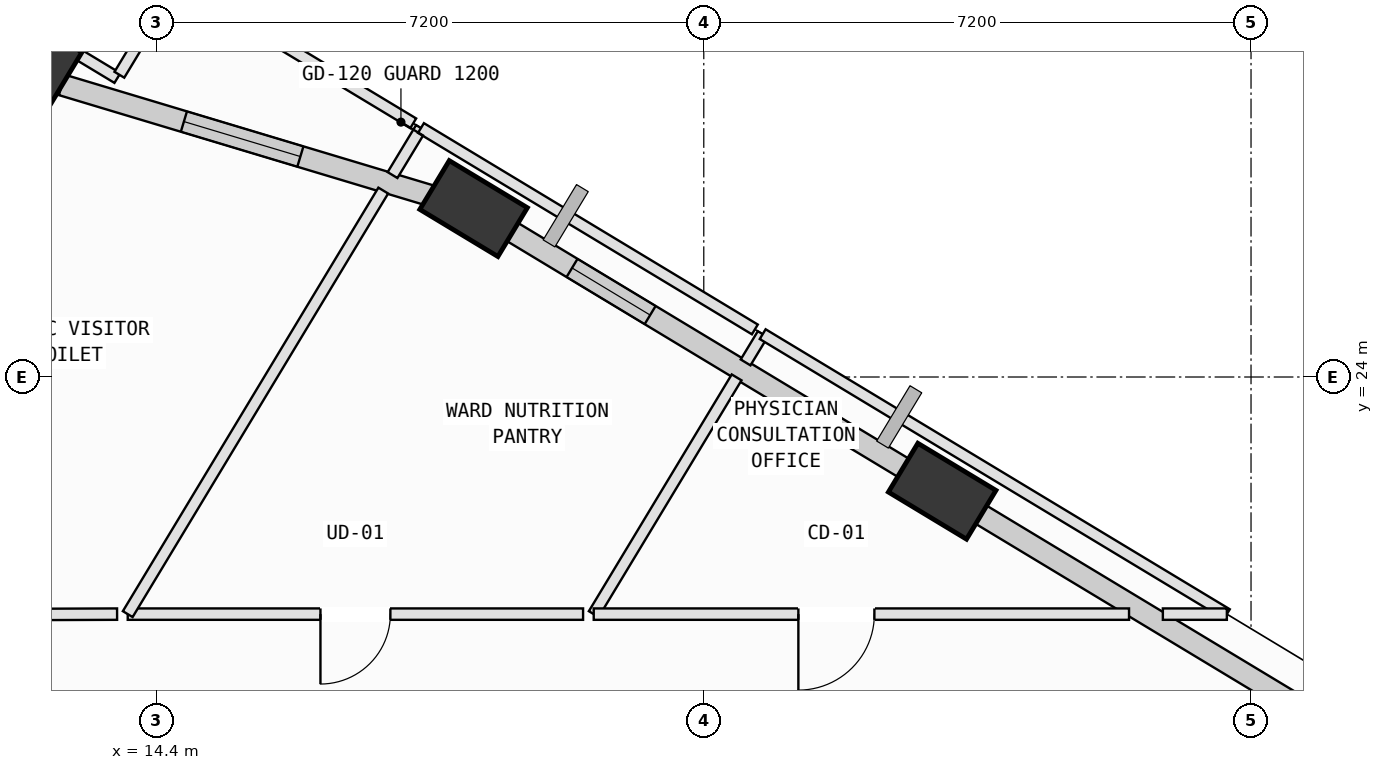
"""IFC4 building model, lengths in metres.
Left out: names, types, materials, properties, quantities, classifications, styles, units other than length and angle.
Written with IfcOpenShell. Run it as: python <this file> out.ifc"""

import sys

from ifc_helpers import new_model, si_unit, direction, frame, frame_2d, origin, origin_2d, place, context, subcontext, project, spatial, rectangle, extrude, element, fill, save


model = new_model("IFC4")
c1 = context("Model", 3, precision=1e-05, world=origin(), true_north=direction((0.0, 1.0)))
c2 = subcontext(c1, "Body", "Model", "MODEL_VIEW")
j1 = project(units=[si_unit("LENGTHUNIT", "METRE"), si_unit("PLANEANGLEUNIT", "RADIAN")], contexts=[c1])
p1 = place(None, origin())
s1 = spatial("IfcSite", under=j1, at=p1, CompositionType="ELEMENT")
p2 = place(p1, origin())
s2 = spatial("IfcBuilding", under=s1, at=p2, CompositionType="ELEMENT")
p3 = place(p2, frame((0.0, 0.0, 276.6)))
s3 = spatial("IfcBuildingStorey", under=s2, at=p3, CompositionType="ELEMENT", Elevation=276.6)
p4 = place(p3, frame((24.737, 22.497, 0.002), z_axis=(0.00982856745, -0.036689248681, 0.999278388785), x_axis=(-0.960666572978, 0.277010492781, 0.019619440675)))
e1 = element("IfcColumn", 1, at=p4, inside=s3, PredefinedType="COLUMN", context=c2, shape_type="SweptSolid", body=[
    extrude(rectangle(XDim=1.2, YDim=0.75, at=origin_2d()), origin(), (0.0, 0.0, 1.0), 3.999),
])
p5 = place(p3, frame((18.572, 26.216, 0.002), z_axis=(-0.005365511084, -0.062252122912, 0.998046033249), x_axis=(-0.808835316802, 0.58714886204, 0.032274511593)))
e2 = element("IfcColumn", 2, at=p5, inside=s3, PredefinedType="COLUMN", context=c2, shape_type="SweptSolid", body=[
    extrude(rectangle(XDim=1.2, YDim=0.75, at=origin_2d()), origin(), (0.0, 0.0, 1.0), 4.004),
])
p6 = place(p3, frame((12.788, 27.953, 0.002), z_axis=(-0.012354535115, -0.086055727352, 0.99621372067), x_axis=(0.632512293176, 0.77096469475, 0.0744421818)))
e3 = element("IfcColumn", 3, at=p6, inside=s3, PredefinedType="COLUMN", context=c2, shape_type="SweptSolid", body=[
    extrude(rectangle(XDim=1.2, YDim=0.75, at=origin_2d()), origin(), (0.0, 0.0, 1.0), 4.011),
])
p7 = place(p3, frame((25.121, 22.265, 0.0), z_axis=(0.0, 0.0, 1.0), x_axis=(0.856273819438, -0.516522164233, 0.0)))
e4 = element("IfcWall", 4, at=p7, inside=s3, PredefinedType="SOLIDWALL", context=c2, shape_type="SweptSolid", body=[
    extrude(rectangle(XDim=6.958, YDim=0.28, at=frame_2d((3.479, 0.0))), origin(), (0.0, 0.0, 1.0), 3.165),
])
p8 = place(p3, frame((18.945, 25.991, 0.0), z_axis=(0.0, 0.0, 1.0), x_axis=(0.856276634429, -0.516517497604, 0.0)))
e5 = element("IfcWall", 5, at=p8, inside=s3, PredefinedType="SOLIDWALL", context=c2, shape_type="SweptSolid", body=[
    extrude(rectangle(XDim=6.424, YDim=0.28, at=frame_2d((3.212, 0.0))), origin(), (0.0, 0.0, 1.0), 3.265),
])
p9 = place(p8, frame((1.076, 0.0, 0.75)))
e6 = element("IfcOpeningElement", 6, at=p9, cuts=e5, PredefinedType="OPENING", context=c2, shape_type="SweptSolid", body=[
    extrude(rectangle(XDim=1.2, YDim=1.75, at=frame_2d((0.6, 0.875))), frame((0.0, 0.15, 0.0), z_axis=(0.0, -1.0, 0.0), x_axis=(1.0, 0.0, 0.0)), (0.0, 0.0, 1.0), 0.3),
])
p10 = place(p3, frame((13.156, 27.843, 0.0), z_axis=(0.0, 0.0, 1.0), x_axis=(0.957728653831, -0.287673122885, 0.0)))
e7 = element("IfcWall", 7, at=p10, inside=s3, PredefinedType="SOLIDWALL", context=c2, shape_type="SweptSolid", body=[
    extrude(rectangle(XDim=5.302, YDim=0.28, at=frame_2d((2.651, 0.0))), origin(), (0.0, 0.0, 1.0), 3.265),
])
p11 = place(p10, frame((1.676, 0.0, 0.75)))
e8 = element("IfcOpeningElement", 8, at=p11, cuts=e7, PredefinedType="OPENING", context=c2, shape_type="SweptSolid", body=[
    extrude(rectangle(XDim=1.6, YDim=1.95, at=frame_2d((0.8, 0.975))), frame((0.0, 0.15, 0.0), z_axis=(0.0, -1.0, 0.0), x_axis=(1.0, 0.0, 0.0)), (0.0, 0.0, 1.0), 0.3),
])
p12 = place(p3, frame((20.152, 20.88, 0.0), z_axis=(0.0, 0.0, 1.0), x_axis=(0.516664967884, 0.856187661066, 0.0)))
e9 = element("IfcWall", 9, at=p12, inside=s3, PredefinedType="PARTITIONING", context=c2, shape_type="SweptSolid", body=[
    extrude(rectangle(XDim=3.638, YDim=0.15, at=frame_2d((1.819, 0.0))), origin(), (0.0, 0.0, 1.0), 3.78),
])
p13 = place(p3, frame((22.15, 24.192, 0.0), z_axis=(0.0, 0.0, 1.0), x_axis=(0.517629661398, 0.855604776541, 0.0)))
e10 = element("IfcWall", 10, at=p13, inside=s3, PredefinedType="PARTITIONING", context=c2, shape_type="SweptSolid", body=[
    extrude(rectangle(XDim=0.435, YDim=0.15, at=frame_2d((0.217, 0.0))), origin(), (0.0, 0.0, 1.0), 3.78),
])
p14 = place(p3, frame((22.375, 24.564, 0.0), z_axis=(0.0, 0.0, 1.0), x_axis=(0.856258144364, -0.516548148975, 0.0)))
e11 = element("IfcWall", 11, at=p14, inside=s3, PredefinedType="PARTITIONING", context=c2, shape_type="SweptSolid", body=[
    extrude(rectangle(XDim=7.132, YDim=0.15, at=frame_2d((3.566, 0.0))), origin(), (0.0, 0.0, 1.0), 3.78),
])
p15 = place(p3, frame((28.482, 20.88, 0.0), z_axis=(0.0, 0.0, 1.0), x_axis=(-1.0, 0.0, 0.0)))
e12 = element("IfcWall", 12, at=p15, inside=s3, PredefinedType="PARTITIONING", context=c2, shape_type="SweptSolid", body=[
    extrude(rectangle(XDim=0.842, YDim=0.15, at=frame_2d((0.421, 0.0))), origin(), (0.0, 0.0, 1.0), 3.78),
])
p16 = place(p3, frame((27.195, 20.88, 0.0), z_axis=(0.0, 0.0, 1.0), x_axis=(-1.0, 0.0, 0.0)))
e13 = element("IfcWall", 13, at=p16, inside=s3, PredefinedType="PARTITIONING", context=c2, shape_type="SweptSolid", body=[
    extrude(rectangle(XDim=7.043, YDim=0.15, at=frame_2d((3.521, 0.0))), origin(), (0.0, 0.0, 1.0), 3.415),
])
p17 = place(p16, frame((3.351, 0.0, 0.0)))
e14 = element("IfcOpeningElement", 14, at=p17, cuts=e13, PredefinedType="OPENING", context=c2, shape_type="SweptSolid", body=[
    extrude(rectangle(XDim=1.0, YDim=2.12, at=frame_2d((0.5, 1.06))), frame((0.0, 0.085, 0.0), z_axis=(0.0, -1.0, 0.0), x_axis=(1.0, 0.0, 0.0)), (0.0, 0.0, 1.0), 0.17),
])
p18 = place(p3, frame((20.012, 20.88, 0.0), z_axis=(0.0, 0.0, 1.0), x_axis=(-1.0, 0.0, 0.0)))
e15 = element("IfcWall", 15, at=p18, inside=s3, PredefinedType="PARTITIONING", context=c2, shape_type="SweptSolid", body=[
    extrude(rectangle(XDim=5.991, YDim=0.15, at=frame_2d((2.996, 0.0))), origin(), (0.0, 0.0, 1.0), 3.415),
])
p19 = place(p18, frame((2.535, 0.0, 0.0)))
e16 = element("IfcOpeningElement", 16, at=p19, cuts=e15, PredefinedType="OPENING", context=c2, shape_type="SweptSolid", body=[
    extrude(rectangle(XDim=0.92, YDim=2.1, at=frame_2d((0.46, 1.05))), frame((0.0, 0.085, 0.0), z_axis=(0.0, -1.0, 0.0), x_axis=(1.0, 0.0, 0.0)), (0.0, 0.0, 1.0), 0.17),
])
p20 = place(p3, frame((14.021, 20.88, 0.0), z_axis=(0.0, 0.0, 1.0), x_axis=(0.516557344827, 0.856252596788, 0.0)))
e17 = element("IfcWall", 17, at=p20, inside=s3, PredefinedType="PARTITIONING", context=c2, shape_type="SweptSolid", body=[
    extrude(rectangle(XDim=6.509, YDim=0.15, at=frame_2d((3.254, 0.0))), origin(), (0.0, 0.0, 1.0), 3.78),
])
p21 = place(p3, frame((17.505, 26.657, 0.0), z_axis=(0.0, 0.0, 1.0), x_axis=(0.517223843864, 0.855850159396, 0.0)))
e18 = element("IfcWall", 18, at=p21, inside=s3, PredefinedType="PARTITIONING", context=c2, shape_type="SweptSolid", body=[
    extrude(rectangle(XDim=0.723, YDim=0.15, at=frame_2d((0.362, 0.0))), origin(), (0.0, 0.0, 1.0), 3.78),
])
p22 = place(p3, frame((17.879, 27.276, 0.0), z_axis=(0.0, 0.0, 1.0), x_axis=(0.856281286362, -0.516509785605, 0.0)))
e19 = element("IfcWall", 19, at=p22, inside=s3, PredefinedType="PARTITIONING", context=c2, shape_type="SweptSolid", body=[
    extrude(rectangle(XDim=5.13, YDim=0.15, at=frame_2d((2.565, 0.0))), origin(), (0.0, 0.0, 1.0), 3.78),
])
p23 = place(p3, frame((12.952, 28.497, 0.0), z_axis=(0.0, 0.0, 1.0), x_axis=(0.8562252486, -0.516602674848, 0.0)))
e20 = element("IfcWall", 20, at=p23, inside=s3, PredefinedType="PARTITIONING", context=c2, shape_type="SweptSolid", body=[
    extrude(rectangle(XDim=1.09, YDim=0.15, at=frame_2d((0.545, 0.0))), origin(), (0.0, 0.0, 1.0), 3.78),
])
p24 = place(p3, frame((13.911, 27.977, 0.0), z_axis=(0.0, 0.0, 1.0), x_axis=(0.516747988371, 0.856137557005, 0.0)))
e21 = element("IfcWall", 21, at=p24, inside=s3, PredefinedType="PARTITIONING", context=c2, shape_type="SweptSolid", body=[
    extrude(rectangle(XDim=1.449, YDim=0.15, at=frame_2d((0.725, 0.0))), origin(), (0.0, 0.0, 1.0), 3.78),
])
p25 = place(p3, frame((14.703, 29.192, 0.0), z_axis=(0.0, 0.0, 1.0), x_axis=(0.856326634789, -0.516434598522, 0.0)))
e22 = element("IfcWall", 22, at=p25, inside=s3, PredefinedType="PARTITIONING", context=c2, shape_type="SweptSolid", body=[
    extrude(rectangle(XDim=3.59, YDim=0.15, at=frame_2d((1.795, 0.0))), origin(), (0.0, 0.0, 1.0), 3.78),
])
p26 = place(p3, frame((13.881, 20.88, 0.0), z_axis=(0.0, 0.0, 1.0), x_axis=(-0.999993441071, -0.003621852376, 0.0)))
e23 = element("IfcWall", 23, at=p26, inside=s3, PredefinedType="PARTITIONING", context=c2, shape_type="SweptSolid", body=[
    extrude(rectangle(XDim=1.348, YDim=0.15, at=frame_2d((0.674, 0.0))), origin(), (0.0, 0.0, 1.0), 3.78),
])
p27 = place(p9, origin())
e24 = element("IfcWindow", 24, at=p27, inside=s3, PartitioningType="SINGLE_PANEL", PredefinedType="WINDOW", context=c2, shape_type="SweptSolid", body=[
    extrude(rectangle(XDim=1.2, YDim=1.75, at=frame_2d((0.6, 0.875))), frame((0.0, 0.03, 0.0), z_axis=(0.0, -1.0, 0.0), x_axis=(1.0, 0.0, 0.0)), (0.0, 0.0, 1.0), 0.06),
])
fill(e6, e24)
p28 = place(p11, origin())
e25 = element("IfcWindow", 25, at=p28, inside=s3, PartitioningType="SINGLE_PANEL", PredefinedType="WINDOW", context=c2, shape_type="SweptSolid", body=[
    extrude(rectangle(XDim=1.6, YDim=1.95, at=frame_2d((0.8, 0.975))), frame((0.0, 0.03, 0.0), z_axis=(0.0, -1.0, 0.0), x_axis=(1.0, 0.0, 0.0)), (0.0, 0.0, 1.0), 0.06),
])
fill(e8, e25)
p29 = place(p17, origin())
e26 = element("IfcDoor", 26, at=p29, inside=s3, OperationType="SINGLE_SWING_RIGHT", PredefinedType="DOOR", context=c2, shape_type="SweptSolid", body=[
    extrude(rectangle(XDim=1.0, YDim=2.12, at=frame_2d((0.5, 1.06))), frame((0.0, 0.025, 0.0), z_axis=(0.0, -1.0, 0.0), x_axis=(1.0, 0.0, 0.0)), (0.0, 0.0, 1.0), 0.05),
])
fill(e14, e26)
p30 = place(p19, origin())
e27 = element("IfcDoor", 27, at=p30, inside=s3, OperationType="SINGLE_SWING_RIGHT", PredefinedType="DOOR", context=c2, shape_type="SweptSolid", body=[
    extrude(rectangle(XDim=0.92, YDim=2.1, at=frame_2d((0.46, 1.05))), frame((0.0, 0.025, 0.0), z_axis=(0.0, -1.0, 0.0), x_axis=(1.0, 0.0, 0.0)), (0.0, 0.0, 1.0), 0.05),
])
fill(e16, e27)
save(model, sys.argv[1])
